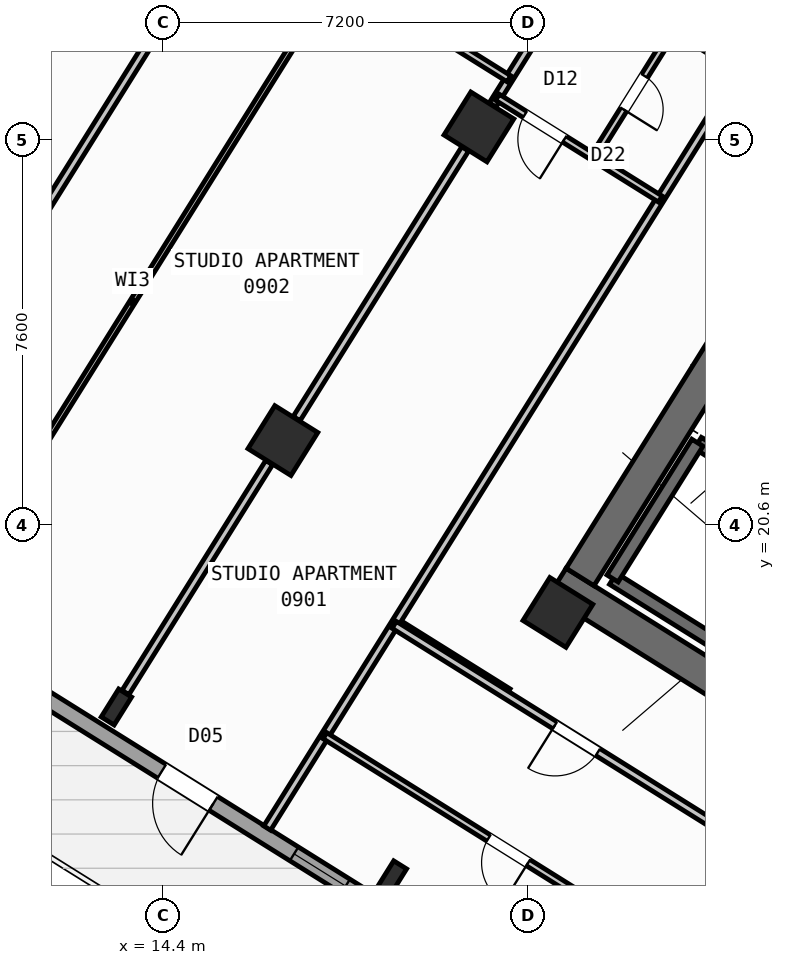
"""IFC4 building model, lengths in metres.
Left out: names, types, materials, properties, quantities, classifications, styles, units other than length and angle.
Written with IfcOpenShell. Run it as: python <this file> out.ifc"""

import sys

from ifc_helpers import new_model, si_unit, direction, frame, frame_2d, origin, origin_2d, place, context, subcontext, project, spatial, rectangle, hollow_rectangle, i_section, extrude, source, transform, mapped, element, fill, save


model = new_model("IFC4")
c1 = context("Model", 3, precision=1e-05, world=origin(), true_north=direction((0.0, 1.0)))
c2 = subcontext(c1, "Body", "Model", "MODEL_VIEW")
j1 = project(units=[si_unit("LENGTHUNIT", "METRE"), si_unit("PLANEANGLEUNIT", "RADIAN")], contexts=[c1])
p1 = place(None, origin())
s1 = spatial("IfcSite", under=j1, at=p1, CompositionType="ELEMENT")
p2 = place(p1, origin())
s2 = spatial("IfcBuilding", under=s1, at=p2, CompositionType="ELEMENT")
p3 = place(p2, frame((0.0, 0.0, 38.4)))
s3 = spatial("IfcBuildingStorey", under=s2, at=p3, CompositionType="ELEMENT", Elevation=38.4)
p4 = place(p3, frame((33.409, 12.45, 0.0), z_axis=(0.0, 0.0, 1.0), x_axis=(-0.848051132073, 0.529914405721, 0.0)))
e1 = element("IfcWall", 1, at=p4, inside=s3, PredefinedType="SHEAR", context=c2, shape_type="SweptSolid", body=[
    extrude(rectangle(XDim=13.24, YDim=0.65, at=frame_2d((6.62, 0.0))), origin(), (0.0, 0.0, 1.0), 3.35),
])
p5 = place(p3, frame((26.007, 24.976, 0.0), z_axis=(0.0, 0.0, 1.0), x_axis=(-0.529916319127, -0.848049936456, 0.0)))
e2 = element("IfcWall", 2, at=p5, inside=s3, PredefinedType="SHEAR", context=c2, shape_type="SweptSolid", body=[
    extrude(rectangle(XDim=6.375, YDim=0.65, at=frame_2d((3.188, 0.0))), origin(), (0.0, 0.0, 1.0), 3.35),
])
m1 = source(origin(), c2, "Body", "SweptSolid", [
    extrude(hollow_rectangle(XDim=1.0, YDim=1.0, WallThickness=0.04, at=origin_2d()), origin(), (0.0, 0.0, 1.0), 3.6),
])
p6 = place(p3, frame((22.191, 18.87, 0.0), z_axis=(0.0, 0.0, 1.0), x_axis=(-0.848048096156, 0.529919264233, 0.0)))
e3 = element("IfcColumn", 3, at=p6, inside=s3, PredefinedType="COLUMN", context=c2, shape_type="MappedRepresentation", body=[
    mapped(m1, transform((0.0, 0.0, 0.0), scale=1.0)),
])
m2 = source(origin(), c2, "Body", "SweptSolid", [
    extrude(i_section(OverallWidth=0.3, OverallDepth=0.65, WebThickness=0.016, FlangeThickness=0.031, at=origin_2d()), origin(), (0.0, 0.0, 1.0), 3.6),
])
p7 = place(p3, frame((18.906, 13.612, 0.0), z_axis=(0.0, 0.0, 1.0), x_axis=(-0.848048096156, 0.529919264233, 0.0)))
e4 = element("IfcColumn", 4, at=p7, inside=s3, PredefinedType="COLUMN", context=c2, shape_type="MappedRepresentation", body=[
    mapped(m2, transform((0.0, 0.0, 0.0), scale=1.0)),
])
for number, where, z_axis, x_axis in (
    (5, (20.632, 28.452, 0.0), (0.0, 0.0, 1.0), (-0.848, 0.53, 0.0)),
    (6, (16.764, 22.261, 0.0), (0.0, 0.0, 1.0), (-0.848, 0.53, 0.0)),
):
    element("IfcColumn", number, at=place(p3, frame(where, z_axis=z_axis, x_axis=x_axis)), inside=s3, PredefinedType="COLUMN", context=c2, shape_type="MappedRepresentation", body=[
        mapped(m1, transform((0.0, 0.0, 0.0), scale=1.0)),
    ])
p8 = place(p3, frame((13.478, 17.003, 0.0), z_axis=(0.0, 0.0, 1.0), x_axis=(-0.848048096156, 0.529919264233, 0.0)))
e7 = element("IfcColumn", 7, at=p8, inside=s3, PredefinedType="COLUMN", context=c2, shape_type="MappedRepresentation", body=[
    mapped(m2, transform((0.0, 0.0, 0.0), scale=1.0)),
])
p9 = place(p3, frame((29.268, 6.429, 0.0), z_axis=(0.0, 0.0, 1.0), x_axis=(-0.848049971435, 0.529916263149, 0.0)))
e8 = element("IfcWall", 8, at=p9, inside=s3, PredefinedType="STANDARD", context=c2, shape_type="SweptSolid", body=[
    extrude(rectangle(XDim=31.588, YDim=0.32, at=frame_2d((15.794, 0.0))), origin(), (0.0, 0.0, 1.0), 3.35),
])
p10 = place(p9, frame((16.362, 0.0, 0.0)))
e9 = element("IfcOpeningElement", 9, at=p10, cuts=e8, PredefinedType="OPENING", context=c2, shape_type="SweptSolid", body=[
    extrude(rectangle(XDim=1.2, YDim=2.15, at=frame_2d((0.6, 1.075))), frame((0.0, 0.17, 0.0), z_axis=(0.0, -1.0, 0.0), x_axis=(1.0, 0.0, 0.0)), (0.0, 0.0, 1.0), 0.34),
])
p11 = place(p9, frame((2.989, 0.0, 0.8)))
e10 = element("IfcOpeningElement", 10, at=p11, cuts=e8, PredefinedType="OPENING", context=c2, shape_type="SweptSolid", body=[
    extrude(rectangle(XDim=2.1, YDim=1.55, at=frame_2d((1.05, 0.775))), frame((0.0, 0.17, 0.0), z_axis=(0.0, -1.0, 0.0), x_axis=(1.0, 0.0, 0.0)), (0.0, 0.0, 1.0), 0.34),
])
p12 = place(p9, frame((8.359, 0.0, 0.8)))
e11 = element("IfcOpeningElement", 11, at=p12, cuts=e8, PredefinedType="OPENING", context=c2, shape_type="SweptSolid", body=[
    extrude(rectangle(XDim=2.1, YDim=1.55, at=frame_2d((1.05, 0.775))), frame((0.0, 0.17, 0.0), z_axis=(0.0, -1.0, 0.0), x_axis=(1.0, 0.0, 0.0)), (0.0, 0.0, 1.0), 0.34),
])
p13 = place(p9, frame((13.284, 0.0, 0.95)))
e12 = element("IfcOpeningElement", 12, at=p13, cuts=e8, PredefinedType="OPENING", context=c2, shape_type="SweptSolid", body=[
    extrude(rectangle(XDim=1.2, YDim=1.4, at=frame_2d((0.6, 0.7))), frame((0.0, 0.17, 0.0), z_axis=(0.0, -1.0, 0.0), x_axis=(1.0, 0.0, 0.0)), (0.0, 0.0, 1.0), 0.34),
])
p14 = place(p9, frame((20.39, 0.0, 0.95)))
e13 = element("IfcOpeningElement", 13, at=p14, cuts=e8, PredefinedType="OPENING", context=c2, shape_type="SweptSolid", body=[
    extrude(rectangle(XDim=1.2, YDim=1.4, at=frame_2d((0.6, 0.7))), frame((0.0, 0.17, 0.0), z_axis=(0.0, -1.0, 0.0), x_axis=(1.0, 0.0, 0.0)), (0.0, 0.0, 1.0), 0.34),
])
p15 = place(p9, frame((23.715, 0.0, 1.0)))
e14 = element("IfcOpeningElement", 14, at=p15, cuts=e8, PredefinedType="OPENING", context=c2, shape_type="SweptSolid", body=[
    extrude(rectangle(XDim=0.9, YDim=1.25, at=frame_2d((0.45, 0.625))), frame((0.0, 0.17, 0.0), z_axis=(0.0, -1.0, 0.0), x_axis=(1.0, 0.0, 0.0)), (0.0, 0.0, 1.0), 0.34),
])
p16 = place(p9, frame((27.481, 0.0, 0.8)))
e15 = element("IfcOpeningElement", 15, at=p16, cuts=e8, PredefinedType="OPENING", context=c2, shape_type="SweptSolid", body=[
    extrude(rectangle(XDim=2.1, YDim=1.55, at=frame_2d((1.05, 0.775))), frame((0.0, 0.17, 0.0), z_axis=(0.0, -1.0, 0.0), x_axis=(1.0, 0.0, 0.0)), (0.0, 0.0, 1.0), 0.34),
])
p17 = place(p3, frame((2.415, 23.452, 0.0), z_axis=(0.0, 0.0, 1.0), x_axis=(0.52991049553, 0.848053575387, 0.0)))
e16 = element("IfcWall", 16, at=p17, inside=s3, PredefinedType="STANDARD", context=c2, shape_type="SweptSolid", body=[
    extrude(rectangle(XDim=21.587, YDim=0.32, at=frame_2d((10.794, 0.0))), origin(), (0.0, 0.0, 1.0), 2.725),
])
p18 = place(p17, frame((2.356, 0.0, 0.8)))
e17 = element("IfcOpeningElement", 17, at=p18, cuts=e16, PredefinedType="OPENING", context=c2, shape_type="SweptSolid", body=[
    extrude(rectangle(XDim=2.1, YDim=1.55, at=frame_2d((1.05, 0.775))), frame((0.0, 0.17, 0.0), z_axis=(0.0, -1.0, 0.0), x_axis=(1.0, 0.0, 0.0)), (0.0, 0.0, 1.0), 0.34),
])
p19 = place(p17, frame((9.344, 0.0, 0.85)))
e18 = element("IfcOpeningElement", 18, at=p19, cuts=e16, PredefinedType="OPENING", context=c2, shape_type="SweptSolid", body=[
    extrude(rectangle(XDim=1.8, YDim=1.5, at=frame_2d((0.9, 0.75))), frame((0.0, 0.17, 0.0), z_axis=(0.0, -1.0, 0.0), x_axis=(1.0, 0.0, 0.0)), (0.0, 0.0, 1.0), 0.34),
])
p20 = place(p17, frame((15.154, 0.0, 0.85)))
e19 = element("IfcOpeningElement", 19, at=p20, cuts=e16, PredefinedType="OPENING", context=c2, shape_type="SweptSolid", body=[
    extrude(rectangle(XDim=1.5, YDim=1.5, at=frame_2d((0.75, 0.75))), frame((0.0, 0.17, 0.0), z_axis=(0.0, -1.0, 0.0), x_axis=(1.0, 0.0, 0.0)), (0.0, 0.0, 1.0), 0.34),
])
p21 = place(p3, frame((14.138, 41.825, 0.0), z_axis=(0.0, 0.0, 1.0), x_axis=(0.848046498049, -0.529921821731, 0.0)))
e20 = element("IfcWall", 20, at=p21, inside=s3, PredefinedType="STANDARD", context=c2, shape_type="SweptSolid", body=[
    extrude(rectangle(XDim=31.588, YDim=0.32, at=frame_2d((15.794, 0.0))), origin(), (0.0, 0.0, 1.0), 3.35),
])
p22 = place(p21, frame((3.369, 0.0, 0.0)))
e21 = element("IfcOpeningElement", 21, at=p22, cuts=e20, PredefinedType="OPENING", context=c2, shape_type="SweptSolid", body=[
    extrude(rectangle(XDim=1.05, YDim=2.15, at=frame_2d((0.525, 1.075))), frame((0.0, 0.17, 0.0), z_axis=(0.0, -1.0, 0.0), x_axis=(1.0, 0.0, 0.0)), (0.0, 0.0, 1.0), 0.34),
])
p23 = place(p21, frame((0.946, 0.0, 0.85)))
e22 = element("IfcOpeningElement", 22, at=p23, cuts=e20, PredefinedType="OPENING", context=c2, shape_type="SweptSolid", body=[
    extrude(rectangle(XDim=1.8, YDim=1.5, at=frame_2d((0.9, 0.75))), frame((0.0, 0.17, 0.0), z_axis=(0.0, -1.0, 0.0), x_axis=(1.0, 0.0, 0.0)), (0.0, 0.0, 1.0), 0.34),
])
p24 = place(p21, frame((8.46, 0.0, 0.85)))
e23 = element("IfcOpeningElement", 23, at=p24, cuts=e20, PredefinedType="OPENING", context=c2, shape_type="SweptSolid", body=[
    extrude(rectangle(XDim=1.8, YDim=1.5, at=frame_2d((0.9, 0.75))), frame((0.0, 0.17, 0.0), z_axis=(0.0, -1.0, 0.0), x_axis=(1.0, 0.0, 0.0)), (0.0, 0.0, 1.0), 0.34),
])
p25 = place(p21, frame((13.899, 0.0, 0.85)))
e24 = element("IfcOpeningElement", 24, at=p25, cuts=e20, PredefinedType="OPENING", context=c2, shape_type="SweptSolid", body=[
    extrude(rectangle(XDim=1.5, YDim=1.5, at=frame_2d((0.75, 0.75))), frame((0.0, 0.17, 0.0), z_axis=(0.0, -1.0, 0.0), x_axis=(1.0, 0.0, 0.0)), (0.0, 0.0, 1.0), 0.34),
])
p26 = place(p21, frame((22.019, 0.0, 0.95)))
e25 = element("IfcOpeningElement", 25, at=p26, cuts=e20, PredefinedType="OPENING", context=c2, shape_type="SweptSolid", body=[
    extrude(rectangle(XDim=1.2, YDim=1.4, at=frame_2d((0.6, 0.7))), frame((0.0, 0.17, 0.0), z_axis=(0.0, -1.0, 0.0), x_axis=(1.0, 0.0, 0.0)), (0.0, 0.0, 1.0), 0.34),
])
p27 = place(p21, frame((27.569, 0.0, 0.95)))
e26 = element("IfcOpeningElement", 26, at=p27, cuts=e20, PredefinedType="OPENING", context=c2, shape_type="SweptSolid", body=[
    extrude(rectangle(XDim=1.2, YDim=1.4, at=frame_2d((0.6, 0.7))), frame((0.0, 0.17, 0.0), z_axis=(0.0, -1.0, 0.0), x_axis=(1.0, 0.0, 0.0)), (0.0, 0.0, 1.0), 0.34),
])
p28 = place(p3, frame((29.605, 15.581, 0.0), z_axis=(0.0, 0.0, 1.0), x_axis=(-0.848036911448, 0.529937163087, 0.0)))
e27 = element("IfcWall", 27, at=p28, inside=s3, PredefinedType="SHEAR", context=c2, shape_type="SweptSolid", body=[
    extrude(rectangle(XDim=7.46, YDim=0.26, at=frame_2d((3.73, 0.0))), origin(), (0.0, 0.0, 1.0), 3.35),
])
p29 = place(p3, frame((31.28, 18.261, 0.0), z_axis=(0.0, 0.0, 1.0), x_axis=(-0.848051618787, 0.529913626805, 0.0)))
e28 = element("IfcWall", 28, at=p29, inside=s3, PredefinedType="SHEAR", context=c2, shape_type="SweptSolid", body=[
    extrude(rectangle(XDim=7.46, YDim=0.26, at=frame_2d((3.73, 0.0))), origin(), (0.0, 0.0, 1.0), 3.35),
])
p30 = place(p29, frame((0.36, 0.0, 0.0)))
e29 = element("IfcOpeningElement", 29, at=p30, cuts=e28, PredefinedType="OPENING", context=c2, shape_type="SweptSolid", body=[
    extrude(rectangle(XDim=0.86, YDim=2.05, at=frame_2d((0.43, 1.025))), frame((0.0, 0.14, 0.0), z_axis=(0.0, -1.0, 0.0), x_axis=(1.0, 0.0, 0.0)), (0.0, 0.0, 1.0), 0.28),
])
p31 = place(p3, frame((24.945, 22.22, 0.0), z_axis=(0.0, 0.0, 1.0), x_axis=(-0.529908658664, -0.84805472316, 0.0)))
e30 = element("IfcWall", 30, at=p31, inside=s3, PredefinedType="SHEAR", context=c2, shape_type="SweptSolid", body=[
    extrude(rectangle(XDim=3.16, YDim=0.26, at=frame_2d((1.58, 0.0))), origin(), (0.0, 0.0, 1.0), 3.35),
])
p32 = place(p3, frame((21.206, 17.292, 0.0), z_axis=(0.0, 0.0, 1.0), x_axis=(-0.848050851465, 0.529914854792, 0.0)))
e31 = element("IfcWall", 31, at=p32, inside=s3, PredefinedType="PARTITIONING", context=c2, shape_type="SweptSolid", body=[
    extrude(rectangle(XDim=2.61, YDim=0.16, at=frame_2d((1.305, 0.0))), origin(), (0.0, 0.0, 1.0), 3.34),
])
p33 = place(p3, frame((25.807, 29.582, 0.0), z_axis=(0.0, 0.0, 1.0), x_axis=(-0.529918119251, -0.84804881162, 0.0)))
e32 = element("IfcWall", 32, at=p33, inside=s3, PredefinedType="PARTITIONING", context=c2, shape_type="SweptSolid", body=[
    extrude(rectangle(XDim=17.65, YDim=0.16, at=frame_2d((8.825, 0.0))), origin(), (0.0, 0.0, 1.0), 3.34),
])
p34 = place(p3, frame((25.807, 29.582, 0.0), z_axis=(0.0, 0.0, 1.0), x_axis=(-0.848052408131, 0.529912363569, 0.0)))
e33 = element("IfcWall", 33, at=p34, inside=s3, PredefinedType="PARTITIONING", context=c2, shape_type="SweptSolid", body=[
    extrude(rectangle(XDim=16.73, YDim=0.16, at=frame_2d((8.365, 0.0))), origin(), (0.0, 0.0, 1.0), 3.34),
])
p35 = place(p34, frame((2.22, 0.0, 0.0)))
e34 = element("IfcOpeningElement", 34, at=p35, cuts=e33, PredefinedType="OPENING", context=c2, shape_type="SweptSolid", body=[
    extrude(rectangle(XDim=0.86, YDim=2.05, at=frame_2d((0.43, 1.025))), frame((0.0, 0.09, 0.0), z_axis=(0.0, -1.0, 0.0), x_axis=(1.0, 0.0, 0.0)), (0.0, 0.0, 1.0), 0.18),
])
p36 = place(p34, frame((7.82, 0.0, 0.0)))
e35 = element("IfcOpeningElement", 35, at=p36, cuts=e33, PredefinedType="OPENING", context=c2, shape_type="SweptSolid", body=[
    extrude(rectangle(XDim=1.0, YDim=2.1, at=frame_2d((0.5, 1.05))), frame((0.0, 0.09, 0.0), z_axis=(0.0, -1.0, 0.0), x_axis=(1.0, 0.0, 0.0)), (0.0, 0.0, 1.0), 0.18),
])
p37 = place(p34, frame((12.95, 0.0, 0.0)))
e36 = element("IfcOpeningElement", 36, at=p37, cuts=e33, PredefinedType="OPENING", context=c2, shape_type="SweptSolid", body=[
    extrude(rectangle(XDim=1.0, YDim=2.1, at=frame_2d((0.5, 1.05))), frame((0.0, 0.09, 0.0), z_axis=(0.0, -1.0, 0.0), x_axis=(1.0, 0.0, 0.0)), (0.0, 0.0, 1.0), 0.18),
])
p38 = place(p3, frame((22.593, 31.59, 0.0), z_axis=(0.0, 0.0, 1.0), x_axis=(-0.529930102756, -0.848041323399, 0.0)))
e37 = element("IfcWall", 37, at=p38, inside=s3, PredefinedType="PARTITIONING", context=c2, shape_type="SweptSolid", body=[
    extrude(rectangle(XDim=3.188, YDim=0.16, at=frame_2d((1.594, 0.0))), origin(), (0.0, 0.0, 1.0), 2.725),
])
p39 = place(p3, frame((20.361, 28.018, 0.0), z_axis=(0.0, 0.0, 1.0), x_axis=(-0.529915015264, -0.848050751193, 0.0)))
e38 = element("IfcWall", 38, at=p39, inside=s3, PredefinedType="PARTITIONING", context=c2, shape_type="SweptSolid", body=[
    extrude(rectangle(XDim=6.276, YDim=0.16, at=frame_2d((3.138, 0.0))), origin(), (0.0, 0.0, 1.0), 2.725),
])
p40 = place(p3, frame((16.492, 21.827, 0.0), z_axis=(0.0, 0.0, 1.0), x_axis=(-0.529904608059, -0.848057254175, 0.0)))
e39 = element("IfcWall", 39, at=p40, inside=s3, PredefinedType="PARTITIONING", context=c2, shape_type="SweptSolid", body=[
    extrude(rectangle(XDim=5.351, YDim=0.16, at=frame_2d((2.675, 0.0))), origin(), (0.0, 0.0, 1.0), 2.725),
])
p41 = place(p3, frame((24.212, 27.029, 0.0), z_axis=(0.0, 0.0, 1.0), x_axis=(-0.84803087207, 0.529946827537, 0.0)))
e40 = element("IfcWall", 40, at=p41, inside=s3, PredefinedType="PLUMBINGWALL", context=c2, shape_type="SweptSolid", body=[
    extrude(rectangle(XDim=3.79, YDim=0.14, at=frame_2d((1.895, 0.0))), origin(), (0.0, 0.0, 1.0), 3.34),
])
p42 = place(p41, frame((2.23, 0.0, 0.0)))
e41 = element("IfcOpeningElement", 41, at=p42, cuts=e40, PredefinedType="OPENING", context=c2, shape_type="SweptSolid", body=[
    extrude(rectangle(XDim=0.92, YDim=2.08, at=frame_2d((0.46, 1.04))), frame((0.0, 0.08, 0.0), z_axis=(0.0, -1.0, 0.0), x_axis=(1.0, 0.0, 0.0)), (0.0, 0.0, 1.0), 0.16),
])
p43 = place(p3, frame((24.492, 30.403, 0.0), z_axis=(0.0, 0.0, 1.0), x_axis=(-0.529977067289, -0.848011974059, 0.0)))
e42 = element("IfcWall", 42, at=p43, inside=s3, PredefinedType="PLUMBINGWALL", context=c2, shape_type="SweptSolid", body=[
    extrude(rectangle(XDim=3.01, YDim=0.14, at=frame_2d((1.505, 0.0))), origin(), (0.0, 0.0, 1.0), 2.995),
])
p44 = place(p43, frame((1.115, 0.0, 0.0)))
e43 = element("IfcOpeningElement", 43, at=p44, cuts=e42, PredefinedType="OPENING", context=c2, shape_type="SweptSolid", body=[
    extrude(rectangle(XDim=0.78, YDim=2.05, at=frame_2d((0.39, 1.025))), frame((0.0, 0.08, 0.0), z_axis=(0.0, -1.0, 0.0), x_axis=(1.0, 0.0, 0.0)), (0.0, 0.0, 1.0), 0.16),
])
p45 = place(p3, frame((14.933, 31.409, 0.0), z_axis=(0.0, 0.0, 1.0), x_axis=(-0.529897533635, -0.848061674554, 0.0)))
e44 = element("IfcWall", 44, at=p45, inside=s3, PredefinedType="PARTITIONING", context=c2, shape_type="SweptSolid", body=[
    extrude(rectangle(XDim=6.276, YDim=0.16, at=frame_2d((3.138, 0.0))), origin(), (0.0, 0.0, 1.0), 2.725),
])
p46 = place(p3, frame((21.226, 29.402, 0.0), z_axis=(0.0, 0.0, 1.0), x_axis=(-0.848039019877, 0.529933789039, 0.0)))
e45 = element("IfcWall", 45, at=p46, inside=s3, PredefinedType="PLUMBINGWALL", context=c2, shape_type="SweptSolid", body=[
    extrude(rectangle(XDim=6.4, YDim=0.14, at=frame_2d((3.2, 0.0))), origin(), (0.0, 0.0, 1.0), 3.34),
])
p47 = place(p46, frame((2.824, 0.0, 0.0)))
e46 = element("IfcOpeningElement", 46, at=p47, cuts=e45, PredefinedType="OPENING", context=c2, shape_type="SweptSolid", body=[
    extrude(rectangle(XDim=0.78, YDim=2.05, at=frame_2d((0.39, 1.025))), frame((0.0, 0.08, 0.0), z_axis=(0.0, -1.0, 0.0), x_axis=(1.0, 0.0, 0.0)), (0.0, 0.0, 1.0), 0.16),
])
p48 = place(p3, frame((17.861, 31.505, 0.0), z_axis=(0.0, 0.0, 1.0), x_axis=(-0.529928839727, -0.848042112649, 0.0)))
e47 = element("IfcWall", 47, at=p48, inside=s3, PredefinedType="PARTITIONING", context=c2, shape_type="SweptSolid", body=[
    extrude(rectangle(XDim=15.34, YDim=0.11, at=frame_2d((7.67, 0.0))), origin(), (0.0, 0.0, 1.0), 3.34),
])
p49 = place(p48, frame((0.35, 0.0, 0.0)))
e48 = element("IfcOpeningElement", 48, at=p49, cuts=e47, PredefinedType="OPENING", context=c2, shape_type="SweptSolid", body=[
    extrude(rectangle(XDim=0.92, YDim=2.08, at=frame_2d((0.46, 1.04))), frame((0.0, 0.065, 0.0), z_axis=(0.0, -1.0, 0.0), x_axis=(1.0, 0.0, 0.0)), (0.0, 0.0, 1.0), 0.13),
])
p50 = place(p3, frame((32.164, 10.374, 0.0), z_axis=(0.0, 0.0, 1.0), x_axis=(-0.848044107957, 0.529925646633, 0.0)))
e49 = element("IfcWall", 49, at=p50, inside=s3, PredefinedType="PARTITIONING", context=c2, shape_type="SweptSolid", body=[
    extrude(rectangle(XDim=15.57, YDim=0.16, at=frame_2d((7.785, 0.0))), origin(), (0.0, 0.0, 1.0), 3.34),
])
p51 = place(p50, frame((10.83, 0.0, 0.0)))
e50 = element("IfcOpeningElement", 50, at=p51, cuts=e49, PredefinedType="OPENING", context=c2, shape_type="SweptSolid", body=[
    extrude(rectangle(XDim=1.0, YDim=2.1, at=frame_2d((0.5, 1.05))), frame((0.0, 0.09, 0.0), z_axis=(0.0, -1.0, 0.0), x_axis=(1.0, 0.0, 0.0)), (0.0, 0.0, 1.0), 0.18),
])
p52 = place(p3, frame((29.72, 8.859, 0.0), z_axis=(0.0, 0.0, 1.0), x_axis=(-0.848049134363, 0.529917602752, 0.0)))
e51 = element("IfcWall", 51, at=p52, inside=s3, PredefinedType="PLUMBINGWALL", context=c2, shape_type="SweptSolid", body=[
    extrude(rectangle(XDim=14.3, YDim=0.14, at=frame_2d((7.15, 0.0))), origin(), (0.0, 0.0, 1.0), 3.34),
])
p53 = place(p52, frame((9.57, 0.0, 0.0)))
e52 = element("IfcOpeningElement", 52, at=p53, cuts=e51, PredefinedType="OPENING", context=c2, shape_type="SweptSolid", body=[
    extrude(rectangle(XDim=0.92, YDim=2.08, at=frame_2d((0.46, 1.04))), frame((0.0, 0.08, 0.0), z_axis=(0.0, -1.0, 0.0), x_axis=(1.0, 0.0, 0.0)), (0.0, 0.0, 1.0), 0.16),
])
p54 = place(p3, frame((26.237, 14.078, 0.0), z_axis=(0.0, 0.0, 1.0), x_axis=(-0.52995640672, -0.848024885824, 0.0)))
e53 = element("IfcWall", 53, at=p54, inside=s3, PredefinedType="PLUMBINGWALL", context=c2, shape_type="SweptSolid", body=[
    extrude(rectangle(XDim=2.58, YDim=0.14, at=frame_2d((1.29, 0.0))), origin(), (0.0, 0.0, 1.0), 3.34),
])
p55 = place(p54, frame((0.9, 0.0, 0.0)))
e54 = element("IfcOpeningElement", 54, at=p55, cuts=e53, PredefinedType="OPENING", context=c2, shape_type="SweptSolid", body=[
    extrude(rectangle(XDim=0.78, YDim=2.05, at=frame_2d((0.39, 1.025))), frame((0.0, 0.08, 0.0), z_axis=(0.0, -1.0, 0.0), x_axis=(1.0, 0.0, 0.0)), (0.0, 0.0, 1.0), 0.16),
])
m3 = source(origin(), c2, "Body", "SweptSolid", [
    extrude(rectangle(XDim=1.2, YDim=2.15, at=frame_2d((0.6, 1.075))), frame((0.0, 0.025, 0.0), z_axis=(0.0, -1.0, 0.0), x_axis=(1.0, 0.0, 0.0)), (0.0, 0.0, 1.0), 0.05),
])
p56 = place(p10, origin())
e55 = element("IfcDoor", 55, at=p56, inside=s3, OperationType="SINGLE_SWING_LEFT", PredefinedType="DOOR", context=c2, shape_type="MappedRepresentation", body=[
    mapped(m3, transform((0.0, 0.0, 0.0), scale=1.0)),
])
fill(e9, e55)
m4 = source(origin(), c2, "Body", "SweptSolid", [
    extrude(rectangle(XDim=1.2, YDim=1.4, at=frame_2d((0.6, 0.7))), frame((0.0, 0.03, 0.0), z_axis=(0.0, -1.0, 0.0), x_axis=(1.0, 0.0, 0.0)), (0.0, 0.0, 1.0), 0.06),
])
p57 = place(p13, origin())
e56 = element("IfcWindow", 56, at=p57, inside=s3, PartitioningType="SINGLE_PANEL", PredefinedType="WINDOW", context=c2, shape_type="MappedRepresentation", body=[
    mapped(m4, transform((0.0, 0.0, 0.0), scale=1.0)),
])
fill(e12, e56)
m5 = source(origin(), c2, "Body", "SweptSolid", [
    extrude(rectangle(XDim=0.92, YDim=2.08, at=frame_2d((0.46, 1.04))), frame((0.0, 0.025, 0.0), z_axis=(0.0, -1.0, 0.0), x_axis=(1.0, 0.0, 0.0)), (0.0, 0.0, 1.0), 0.05),
])
p58 = place(p42, origin())
e57 = element("IfcDoor", 57, at=p58, inside=s3, OperationType="SINGLE_SWING_LEFT", PredefinedType="DOOR", context=c2, shape_type="MappedRepresentation", body=[
    mapped(m5, transform((0.0, 0.0, 0.0), scale=1.0)),
])
fill(e41, e57)
m6 = source(origin(), c2, "Body", "SweptSolid", [
    extrude(rectangle(XDim=0.78, YDim=2.05, at=frame_2d((0.39, 1.025))), frame((0.0, 0.025, 0.0), z_axis=(0.0, -1.0, 0.0), x_axis=(1.0, 0.0, 0.0)), (0.0, 0.0, 1.0), 0.05),
])
p59 = place(p44, origin())
e58 = element("IfcDoor", 58, at=p59, inside=s3, OperationType="SINGLE_SWING_RIGHT", PredefinedType="DOOR", context=c2, shape_type="MappedRepresentation", body=[
    mapped(m6, transform((0.0, 0.0, 0.0), scale=1.0)),
])
fill(e43, e58)
m7 = source(origin(), c2, "Body", "SweptSolid", [
    extrude(rectangle(XDim=1.0, YDim=2.1, at=frame_2d((0.5, 1.05))), frame((0.0, 0.025, 0.0), z_axis=(0.0, -1.0, 0.0), x_axis=(1.0, 0.0, 0.0)), (0.0, 0.0, 1.0), 0.05),
])
p60 = place(p51, origin())
e59 = element("IfcDoor", 59, at=p60, inside=s3, OperationType="SINGLE_SWING_RIGHT", PredefinedType="DOOR", context=c2, shape_type="MappedRepresentation", body=[
    mapped(m7, transform((0.0, 0.0, 0.0), scale=1.0)),
])
fill(e50, e59)
p61 = place(p53, origin())
e60 = element("IfcDoor", 60, at=p61, inside=s3, OperationType="SINGLE_SWING_LEFT", PredefinedType="DOOR", context=c2, shape_type="MappedRepresentation", body=[
    mapped(m5, transform((0.0, 0.0, 0.0), scale=1.0)),
])
fill(e52, e60)
save(model, sys.argv[1])
